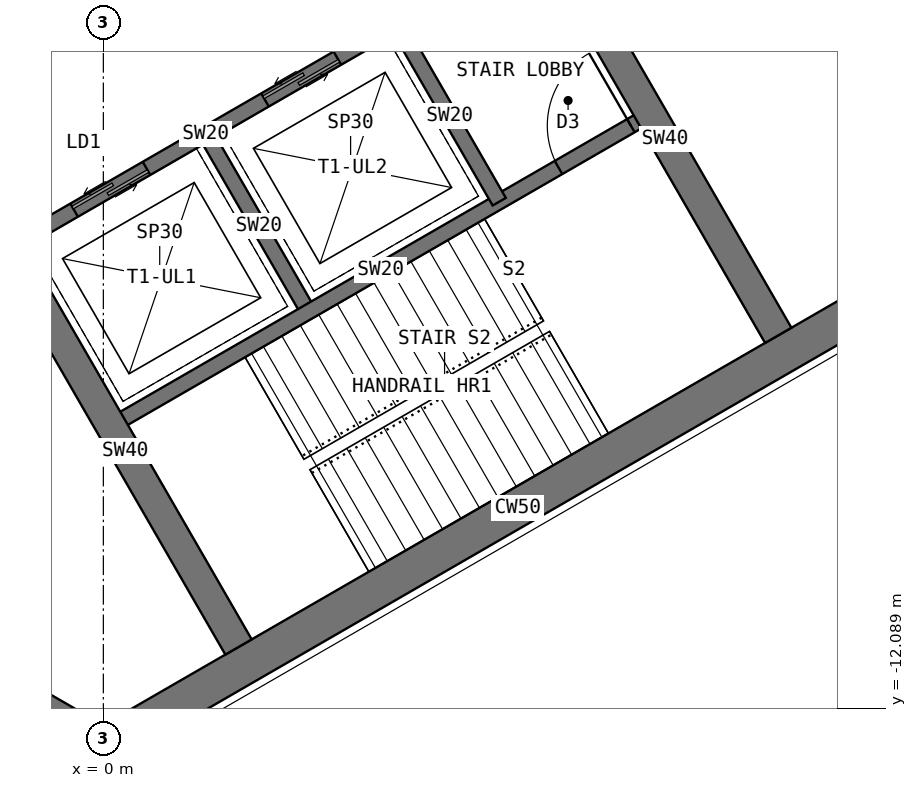
"""IFC4 building model, lengths in metres.
Left out: names, types, materials, properties, quantities, classifications, styles, units other than length and angle.
Written with IfcOpenShell. Run it as: python <this file> out.ifc"""

import sys

from ifc_helpers import new_model, si_unit, direction, frame, frame_2d, origin, place, context, subcontext, project, spatial, rectangle, extrude, element, fill, save


model = new_model("IFC4")
c1 = context("Model", 3, precision=1e-05, world=origin(), true_north=direction((0.0, 1.0)))
c2 = subcontext(c1, "Body", "Model", "MODEL_VIEW")
j1 = project(units=[si_unit("LENGTHUNIT", "METRE"), si_unit("PLANEANGLEUNIT", "RADIAN")], contexts=[c1])
p1 = place(None, origin())
s1 = spatial("IfcSite", under=j1, at=p1, CompositionType="ELEMENT")
p2 = place(p1, origin())
s2 = spatial("IfcBuilding", under=s1, at=p2, CompositionType="ELEMENT")
p3 = place(p2, frame((0.0, 0.0, 238.5)))
s3 = spatial("IfcBuildingStorey", under=s2, at=p3, CompositionType="ELEMENT", Elevation=238.5)
p4 = place(p3, frame((-3.939, -10.322, 0.0), z_axis=(0.0, 0.0, 1.0), x_axis=(0.866011268655, -0.500024481964, 0.0)))
e1 = element("IfcWall", 1, at=p4, inside=s3, PredefinedType="SHEAR", context=c2, shape_type="SweptSolid", body=[
    extrude(rectangle(XDim=4.548, YDim=0.5, at=frame_2d((2.274, 0.0))), origin(), (0.0, 0.0, 1.0), 5.0),
])
p5 = place(p3, frame((0.0, -12.596, 0.0), z_axis=(0.0, 0.0, 1.0), x_axis=(0.866021940709, 0.500005998175, 0.0)))
e2 = element("IfcWall", 2, at=p5, inside=s3, PredefinedType="SHEAR", context=c2, shape_type="SweptSolid", body=[
    extrude(rectangle(XDim=12.596, YDim=0.5, at=frame_2d((6.298, 0.0))), origin(), (0.0, 0.0, 1.0), 5.0),
])
p6 = place(p3, frame((-1.164, -5.984, 0.0), z_axis=(0.0, 0.0, 1.0), x_axis=(0.866026010844, 0.49999894854, 0.0)))
e3 = element("IfcWall", 3, at=p6, inside=s3, PredefinedType="SHEAR", context=c2, shape_type="SweptSolid", body=[
    extrude(rectangle(XDim=8.0, YDim=0.2, at=frame_2d((4.0, 0.0))), origin(), (0.0, 0.0, 1.0), 5.0),
])
p7 = place(p6, frame((6.3, 0.0, 0.0)))
e4 = element("IfcOpeningElement", 4, at=p7, cuts=e3, PredefinedType="OPENING", context=c2, shape_type="SweptSolid", body=[
    extrude(rectangle(XDim=1.2, YDim=2.1, at=frame_2d((0.6, 1.05))), frame((0.0, 0.11, 0.0), z_axis=(0.0, -1.0, 0.0), x_axis=(1.0, 0.0, 0.0)), (0.0, 0.0, 1.0), 0.22),
])
p8 = place(p6, frame((0.9, 0.0, 0.0)))
e5 = element("IfcOpeningElement", 5, at=p8, cuts=e3, PredefinedType="OPENING", context=c2, shape_type="SweptSolid", body=[
    extrude(rectangle(XDim=1.1, YDim=2.2, at=frame_2d((0.55, 1.1))), frame((0.0, 0.11, 0.0), z_axis=(0.0, -1.0, 0.0), x_axis=(1.0, 0.0, 0.0)), (0.0, 0.0, 1.0), 0.22),
])
p9 = place(p6, frame((3.8, 0.0, 0.0)))
e6 = element("IfcOpeningElement", 6, at=p9, cuts=e3, PredefinedType="OPENING", context=c2, shape_type="SweptSolid", body=[
    extrude(rectangle(XDim=1.1, YDim=2.2, at=frame_2d((0.55, 1.1))), frame((0.0, 0.11, 0.0), z_axis=(0.0, -1.0, 0.0), x_axis=(1.0, 0.0, 0.0)), (0.0, 0.0, 1.0), 0.22),
])
p10 = place(p3, frame((1.397, -4.62, 0.0), z_axis=(0.0, 0.0, 1.0), x_axis=(0.499936506574, -0.866062058628, 0.0)))
e7 = element("IfcWall", 7, at=p10, inside=s3, PredefinedType="SHEAR", context=c2, shape_type="SweptSolid", body=[
    extrude(rectangle(XDim=2.6, YDim=0.2, at=frame_2d((1.3, 0.0))), origin(), (0.0, 0.0, 1.0), 5.0),
])
p11 = place(p3, frame((3.909, -3.17, 0.0), z_axis=(0.0, 0.0, 1.0), x_axis=(0.49997716683, -0.86603858612, 0.0)))
e8 = element("IfcWall", 8, at=p11, inside=s3, PredefinedType="SHEAR", context=c2, shape_type="SweptSolid", body=[
    extrude(rectangle(XDim=2.6, YDim=0.2, at=frame_2d((1.3, 0.0))), origin(), (0.0, 0.0, 1.0), 5.0),
])
p12 = place(p3, frame((0.186, -8.322, 0.0), z_axis=(0.0, 0.0, 1.0), x_axis=(0.866026010844, 0.49999894854, 0.0)))
e9 = element("IfcWall", 9, at=p12, inside=s3, PredefinedType="SHEAR", context=c2, shape_type="SweptSolid", body=[
    extrude(rectangle(XDim=8.0, YDim=0.2, at=frame_2d((4.0, 0.0))), origin(), (0.0, 0.0, 1.0), 5.0),
])
p13 = place(p12, frame((6.7, 0.0, 0.0)))
e10 = element("IfcOpeningElement", 10, at=p13, cuts=e9, PredefinedType="OPENING", context=c2, shape_type="SweptSolid", body=[
    extrude(rectangle(XDim=1.1, YDim=2.1, at=frame_2d((0.55, 1.05))), frame((0.0, 0.11, 0.0), z_axis=(0.0, -1.0, 0.0), x_axis=(1.0, 0.0, 0.0)), (0.0, 0.0, 1.0), 0.22),
])
p14 = place(p3, frame((5.901, -2.02, 0.0), z_axis=(0.0, 0.0, 1.0), x_axis=(0.500003832394, -0.86602319114, 0.0)))
e11 = element("IfcWall", 11, at=p14, inside=s3, PredefinedType="SHEAR", context=c2, shape_type="SweptSolid", body=[
    extrude(rectangle(XDim=5.958, YDim=0.4, at=frame_2d((2.979, 0.0))), origin(), (0.0, 0.0, 1.0), 5.0),
])
p15 = place(p3, frame((-1.201, -6.12, 0.0), z_axis=(0.0, 0.0, 1.0), x_axis=(0.500021575205, -0.866012946976, 0.0)))
e12 = element("IfcWall", 12, at=p15, inside=s3, PredefinedType="SHEAR", context=c2, shape_type="SweptSolid", body=[
    extrude(rectangle(XDim=5.958, YDim=0.4, at=frame_2d((2.979, 0.0))), origin(), (0.0, 0.0, 1.0), 5.0),
])
p16 = place(p8, origin())
e13 = element("IfcDoor", 13, at=p16, inside=s3, OperationType="DOUBLE_DOOR_SLIDING", PredefinedType="DOOR", context=c2, shape_type="SweptSolid", body=[
    extrude(rectangle(XDim=1.1, YDim=2.2, at=frame_2d((0.55, 1.1))), frame((0.0, 0.025, 0.0), z_axis=(0.0, -1.0, 0.0), x_axis=(1.0, 0.0, 0.0)), (0.0, 0.0, 1.0), 0.05),
])
fill(e5, e13)
p17 = place(p9, origin())
e14 = element("IfcDoor", 14, at=p17, inside=s3, OperationType="DOUBLE_DOOR_SLIDING", PredefinedType="DOOR", context=c2, shape_type="SweptSolid", body=[
    extrude(rectangle(XDim=1.1, YDim=2.2, at=frame_2d((0.55, 1.1))), frame((0.0, 0.025, 0.0), z_axis=(0.0, -1.0, 0.0), x_axis=(1.0, 0.0, 0.0)), (0.0, 0.0, 1.0), 0.05),
])
fill(e6, e14)
p18 = place(p13, origin())
e15 = element("IfcDoor", 15, at=p18, inside=s3, OperationType="SINGLE_SWING_RIGHT", PredefinedType="DOOR", context=c2, shape_type="SweptSolid", body=[
    extrude(rectangle(XDim=1.1, YDim=2.1, at=frame_2d((0.55, 1.05))), frame((0.0, 0.025, 0.0), z_axis=(0.0, -1.0, 0.0), x_axis=(1.0, 0.0, 0.0)), (0.0, 0.0, 1.0), 0.05),
])
fill(e10, e15)
save(model, sys.argv[1])
